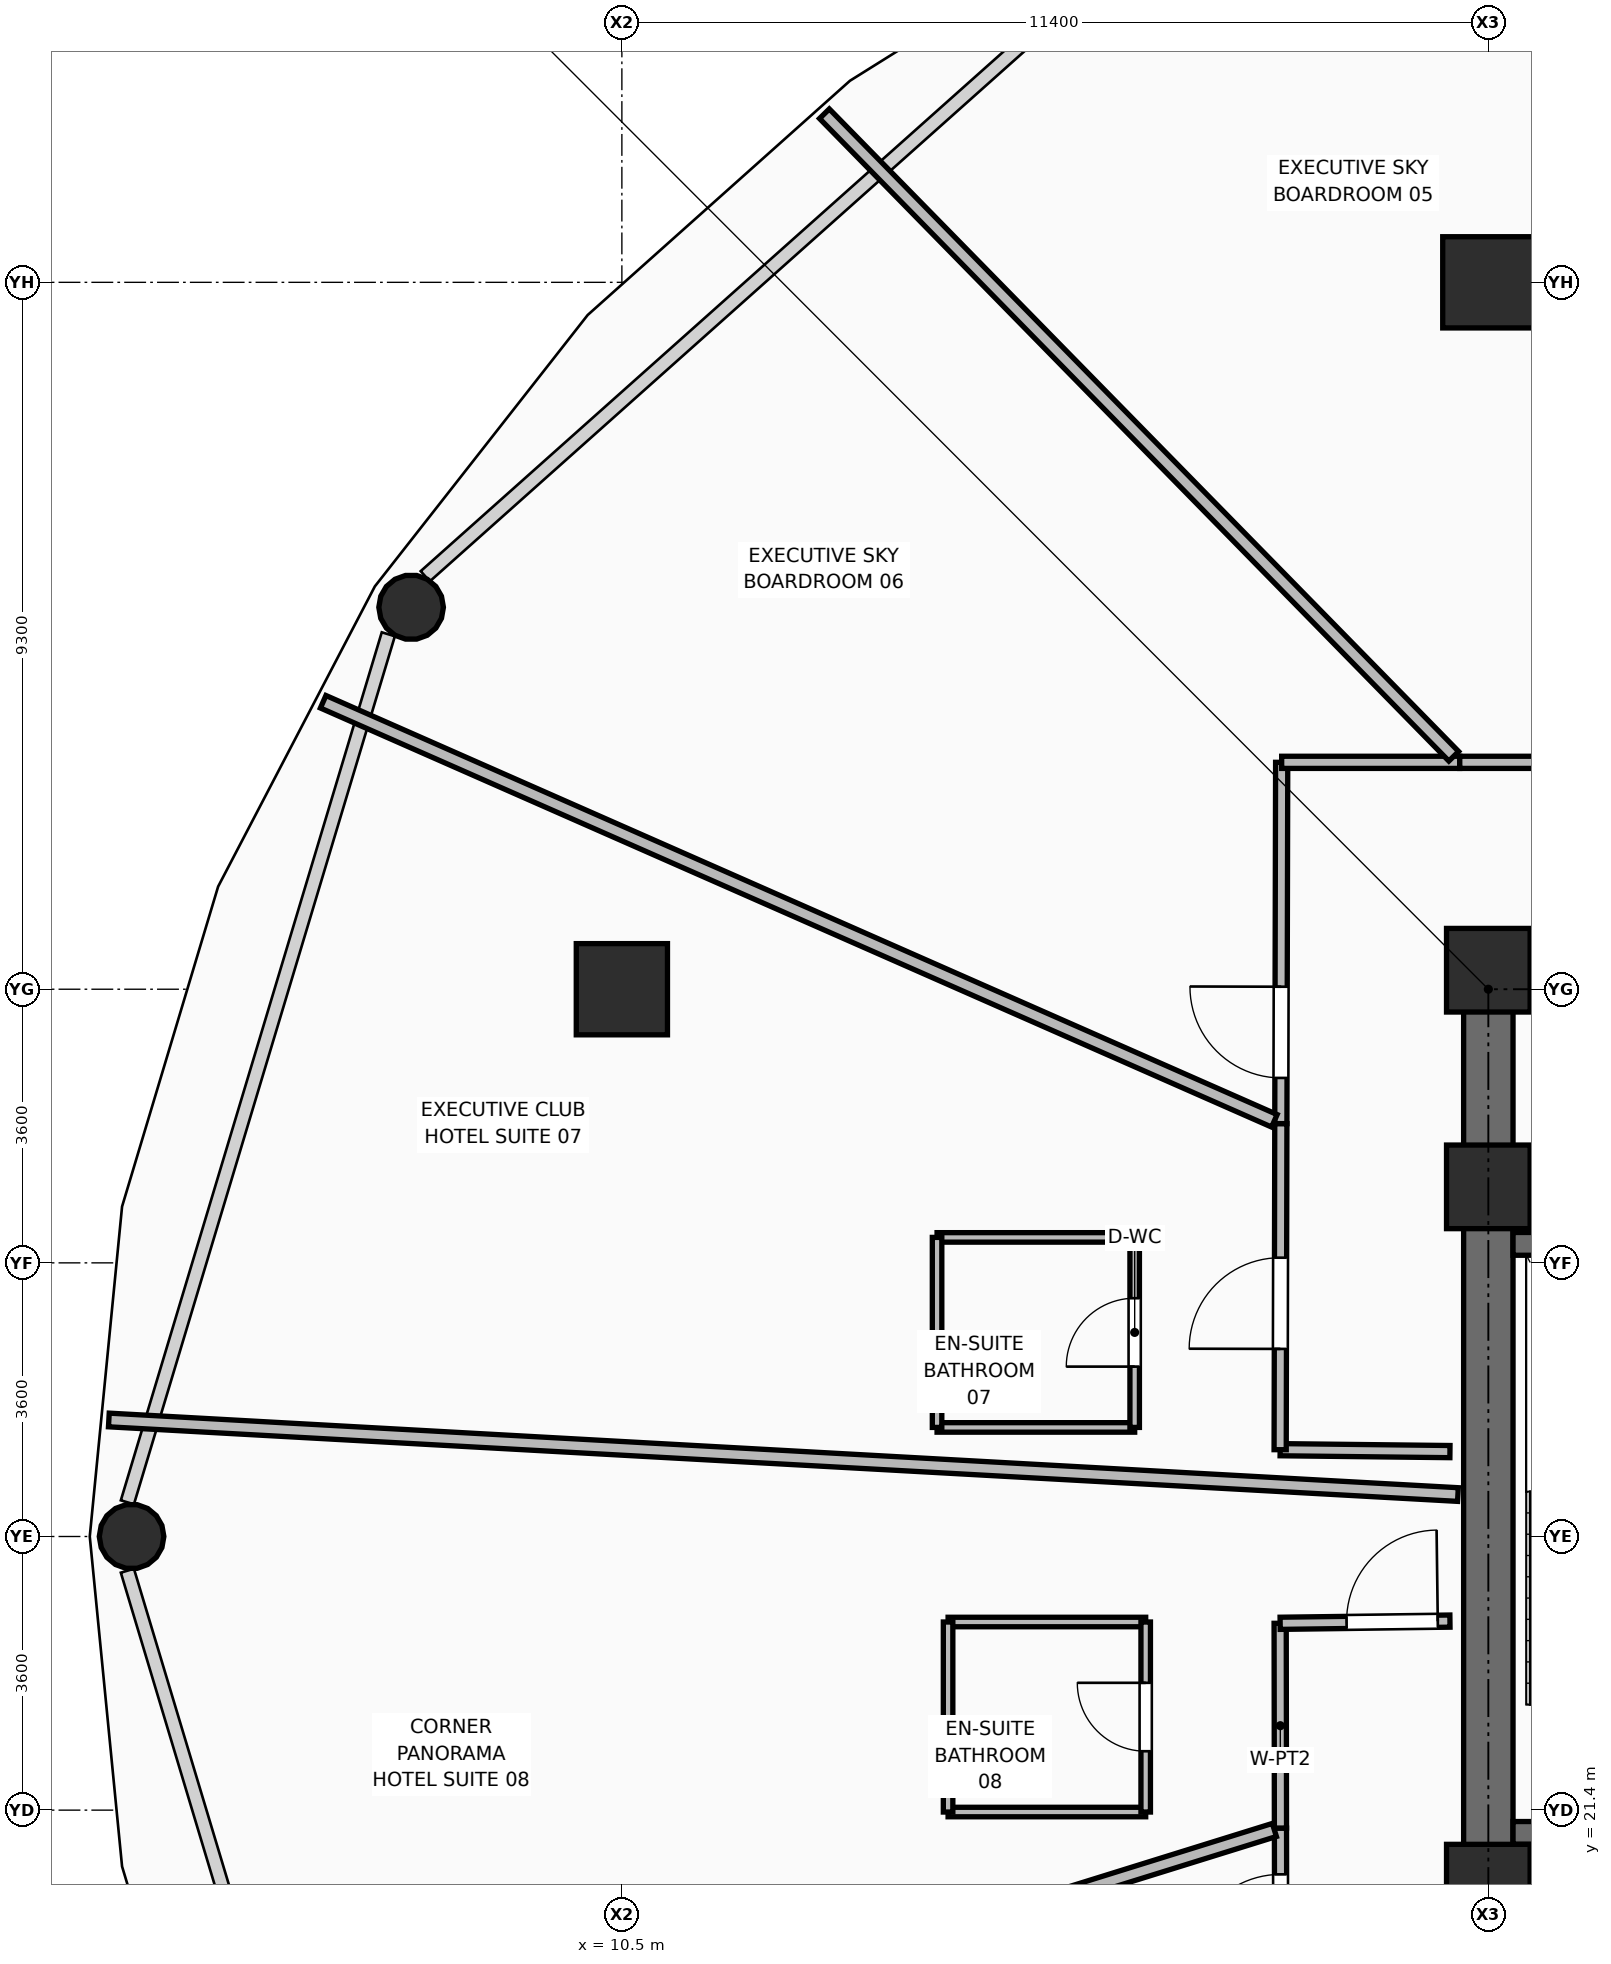
"""IFC4 building model, lengths in metres.
Left out: names, types, materials, properties, quantities, classifications, styles, units other than length and angle.
Written with IfcOpenShell. Run it as: python <this file> out.ifc"""

import sys

from ifc_helpers import new_model, si_unit, direction, frame, frame_2d, origin, origin_2d, place, context, subcontext, project, spatial, rectangle, hollow_rectangle, hollow_circle, extrude, element, fill, save


model = new_model("IFC4")
c1 = context("Model", 3, precision=1e-05, world=origin(), true_north=direction((0.0, 1.0)))
c2 = subcontext(c1, "Body", "Model", "MODEL_VIEW")
j1 = project(units=[si_unit("LENGTHUNIT", "METRE"), si_unit("PLANEANGLEUNIT", "RADIAN")], contexts=[c1])
p1 = place(None, origin())
s1 = spatial("IfcSite", under=j1, at=p1, CompositionType="ELEMENT")
p2 = place(p1, origin())
s2 = spatial("IfcBuilding", under=s1, at=p2, CompositionType="ELEMENT")
p3 = place(p2, frame((0.0, 0.0, 57.0)))
s3 = spatial("IfcBuildingStorey", under=s2, at=p3, CompositionType="ELEMENT", Elevation=57.0)
for number, where, z_axis, x_axis in (
    (1, (21.9, 20.4, 0.0), (0.0, 0.0, 1.0), (1.0, 0.0, 0.0)),
    (2, (21.9, 29.6, 0.0), (0.0, 0.0, 1.0), (1.0, 0.0, 0.0)),
    (3, (21.9, 32.45, 0.0), (0.0, 0.0, 1.0), (1.0, 0.0, 0.0)),
):
    element("IfcColumn", number, at=place(p3, frame(where, z_axis=z_axis, x_axis=x_axis)), inside=s3, PredefinedType="COLUMN", context=c2, shape_type="SweptSolid", body=[
        extrude(rectangle(XDim=1.1, YDim=1.1, at=origin_2d()), origin(), (0.0, 0.0, 1.0), 3.75),
    ])
for number, where, z_axis, x_axis in (
    (4, (10.5, 32.2, 0.0), (0.0, 0.0, 1.0), (1.0, 0.0, 0.0)),
    (5, (21.9, 41.5, 0.0), (0.0, 0.0, 1.0), (1.0, 0.0, 0.0)),
):
    element("IfcColumn", number, at=place(p3, frame(where, z_axis=z_axis, x_axis=x_axis)), inside=s3, PredefinedType="COLUMN", context=c2, shape_type="SweptSolid", body=[
        extrude(hollow_rectangle(XDim=1.2, YDim=1.2, WallThickness=0.045, at=origin_2d()), origin(), (0.0, 0.0, 1.0), 3.75),
    ])
for number, where, z_axis, x_axis in (
    (6, (7.727, 37.225, 0.0), (0.0, 0.0, 1.0), (1.0, 0.0, 0.0)),
    (7, (4.049, 25.0, 0.0), (0.0, 0.0, 1.0), (1.0, 0.0, 0.0)),
):
    element("IfcColumn", number, at=place(p3, frame(where, z_axis=z_axis, x_axis=x_axis)), inside=s3, PredefinedType="COLUMN", context=c2, shape_type="SweptSolid", body=[
        extrude(hollow_circle(Radius=0.425, WallThickness=0.04, at=origin_2d()), origin(), (0.0, 0.0, 1.0), 3.57),
    ])
p4 = place(p3, frame((21.575, 32.45, 0.0), z_axis=(0.0, 0.0, 1.0), x_axis=(1.0, 0.0, 0.0)))
e8 = element("IfcWall", 8, at=p4, inside=s3, PredefinedType="SHEAR", context=c2, shape_type="SweptSolid", body=[
    extrude(rectangle(XDim=19.85, YDim=0.65, at=frame_2d((9.925, 0.0))), origin(), (0.0, 0.0, 1.0), 3.57),
])
p5 = place(p4, frame((2.175, 0.0, 0.0)))
e9 = element("IfcOpeningElement", 9, at=p5, cuts=e8, PredefinedType="OPENING", context=c2, shape_type="SweptSolid", body=[
    extrude(rectangle(XDim=1.1, YDim=2.1, at=frame_2d((0.55, 1.05))), frame((0.0, 0.335, 0.0), z_axis=(0.0, -1.0, 0.0), x_axis=(1.0, 0.0, 0.0)), (0.0, 0.0, 1.0), 0.67),
])
p6 = place(p4, frame((15.565, 0.0, 0.0)))
e10 = element("IfcOpeningElement", 10, at=p6, cuts=e8, PredefinedType="OPENING", context=c2, shape_type="SweptSolid", body=[
    extrude(rectangle(XDim=1.0, YDim=2.1, at=frame_2d((0.5, 1.05))), frame((0.0, 0.335, 0.0), z_axis=(0.0, -1.0, 0.0), x_axis=(1.0, 0.0, 0.0)), (0.0, 0.0, 1.0), 0.67),
])
p7 = place(p4, frame((17.575, 0.0, 0.0)))
e11 = element("IfcOpeningElement", 11, at=p7, cuts=e8, PredefinedType="OPENING", context=c2, shape_type="SweptSolid", body=[
    extrude(rectangle(XDim=0.9, YDim=2.1, at=frame_2d((0.45, 1.05))), frame((0.0, 0.335, 0.0), z_axis=(0.0, -1.0, 0.0), x_axis=(1.0, 0.0, 0.0)), (0.0, 0.0, 1.0), 0.67),
])
p8 = place(p3, frame((21.9, 18.125, 0.0), z_axis=(0.0, 0.0, 1.0), x_axis=(0.0, 1.0, 0.0)))
e12 = element("IfcWall", 12, at=p8, inside=s3, PredefinedType="SHEAR", context=c2, shape_type="SweptSolid", body=[
    extrude(rectangle(XDim=14.0, YDim=0.65, at=frame_2d((7.0, 0.0))), origin(), (0.0, 0.0, 1.0), 3.57),
])
p9 = place(p3, frame((22.225, 21.1, 0.0), z_axis=(0.0, 0.0, 1.0), x_axis=(1.0, 0.0, 0.0)))
e13 = element("IfcWall", 13, at=p9, inside=s3, PredefinedType="SHEAR", context=c2, shape_type="SweptSolid", body=[
    extrude(rectangle(XDim=3.515, YDim=0.3, at=frame_2d((1.757, 0.0))), origin(), (0.0, 0.0, 1.0), 3.57),
])
p10 = place(p9, frame((1.995, 0.0, 0.0)))
e14 = element("IfcOpeningElement", 14, at=p10, cuts=e13, PredefinedType="OPENING", context=c2, shape_type="SweptSolid", body=[
    extrude(rectangle(XDim=1.05, YDim=2.1, at=frame_2d((0.525, 1.05))), frame((0.0, 0.16, 0.0), z_axis=(0.0, -1.0, 0.0), x_axis=(1.0, 0.0, 0.0)), (0.0, 0.0, 1.0), 0.32),
])
p11 = place(p3, frame((22.225, 28.85, 0.0), z_axis=(0.0, 0.0, 1.0), x_axis=(1.0, 0.0, 0.0)))
e15 = element("IfcWall", 15, at=p11, inside=s3, PredefinedType="SHEAR", context=c2, shape_type="SweptSolid", body=[
    extrude(rectangle(XDim=3.515, YDim=0.3, at=frame_2d((1.757, 0.0))), origin(), (0.0, 0.0, 1.0), 3.57),
])
p12 = place(p3, frame((21.395, 26.117, 0.0), z_axis=(0.0, 0.0, 1.0), x_axis=(-0.999936661747, 0.011254887571, 0.0)))
e16 = element("IfcWall", 16, at=p12, inside=s3, PredefinedType="PARTITIONING", context=c2, shape_type="SweptSolid", body=[
    extrude(rectangle(XDim=2.234, YDim=0.16, at=frame_2d((1.117, 0.0))), origin(), (0.0, 0.0, 1.0), 3.55),
])
p13 = place(p3, frame((19.161, 26.142, 0.0), z_axis=(0.0, 0.0, 1.0), x_axis=(0.002105737748, 0.999997782932, 0.0)))
e17 = element("IfcWall", 17, at=p13, inside=s3, PredefinedType="PARTITIONING", context=c2, shape_type="SweptSolid", body=[
    extrude(rectangle(XDim=4.29, YDim=0.16, at=frame_2d((2.145, 0.0))), origin(), (0.0, 0.0, 1.0), 3.55),
])
p14 = place(p13, frame((1.326, 0.0, 0.0)))
e18 = element("IfcOpeningElement", 18, at=p14, cuts=e17, PredefinedType="OPENING", context=c2, shape_type="SweptSolid", body=[
    extrude(rectangle(XDim=1.2, YDim=2.1, at=frame_2d((0.6, 1.05))), frame((0.0, 0.09, 0.0), z_axis=(0.0, -1.0, 0.0), x_axis=(1.0, 0.0, 0.0)), (0.0, 0.0, 1.0), 0.18),
])
p15 = place(p3, frame((19.17, 30.432, 0.0), z_axis=(0.0, 0.0, 1.0), x_axis=(0.002311360614, 0.999997328802, 0.0)))
e19 = element("IfcWall", 19, at=p15, inside=s3, PredefinedType="PARTITIONING", context=c2, shape_type="SweptSolid", body=[
    extrude(rectangle(XDim=4.753, YDim=0.16, at=frame_2d((2.376, 0.0))), origin(), (0.0, 0.0, 1.0), 2.928),
])
p16 = place(p15, frame((0.601, 0.0, 0.0)))
e20 = element("IfcOpeningElement", 20, at=p16, cuts=e19, PredefinedType="OPENING", context=c2, shape_type="SweptSolid", body=[
    extrude(rectangle(XDim=1.2, YDim=2.1, at=frame_2d((0.6, 1.05))), frame((0.0, 0.09, 0.0), z_axis=(0.0, -1.0, 0.0), x_axis=(1.0, 0.0, 0.0)), (0.0, 0.0, 1.0), 0.18),
])
p17 = place(p3, frame((19.181, 35.185, 0.0), z_axis=(0.0, 0.0, 1.0), x_axis=(1.0, 0.0, 0.0)))
e21 = element("IfcWall", 21, at=p17, inside=s3, PredefinedType="PARTITIONING", context=c2, shape_type="SweptSolid", body=[
    extrude(rectangle(XDim=2.343, YDim=0.16, at=frame_2d((1.171, 0.0))), origin(), (0.0, 0.0, 1.0), 2.928),
])
p18 = place(p3, frame((21.524, 35.185, 0.0), z_axis=(0.0, 0.0, 1.0), x_axis=(1.0, 0.0, 0.0)))
e22 = element("IfcWall", 22, at=p18, inside=s3, PredefinedType="PARTITIONING", context=c2, shape_type="SweptSolid", body=[
    extrude(rectangle(XDim=6.093, YDim=0.16, at=frame_2d((3.046, 0.0))), origin(), (0.0, 0.0, 1.0), 3.55),
])
p19 = place(p18, frame((2.373, 0.0, 0.0)))
e23 = element("IfcOpeningElement", 23, at=p19, cuts=e22, PredefinedType="OPENING", context=c2, shape_type="SweptSolid", body=[
    extrude(rectangle(XDim=1.2, YDim=2.1, at=frame_2d((0.6, 1.05))), frame((0.0, 0.09, 0.0), z_axis=(0.0, -1.0, 0.0), x_axis=(1.0, 0.0, 0.0)), (0.0, 0.0, 1.0), 0.18),
])
p20 = place(p3, frame((19.176, 15.151, 0.0), z_axis=(0.0, 0.0, 1.0), x_axis=(-0.001827037145, 0.999998330966, 0.0)))
e24 = element("IfcWall", 24, at=p20, inside=s3, PredefinedType="PARTITIONING", context=c2, shape_type="SweptSolid", body=[
    extrude(rectangle(XDim=6.013, YDim=0.16, at=frame_2d((3.007, 0.0))), origin(), (0.0, 0.0, 1.0), 2.928),
])
p21 = place(p20, frame((4.204, 0.0, 0.0)))
e25 = element("IfcOpeningElement", 25, at=p21, cuts=e24, PredefinedType="OPENING", context=c2, shape_type="SweptSolid", body=[
    extrude(rectangle(XDim=1.2, YDim=2.1, at=frame_2d((0.6, 1.05))), frame((0.0, 0.09, 0.0), z_axis=(0.0, -1.0, 0.0), x_axis=(1.0, 0.0, 0.0)), (0.0, 0.0, 1.0), 0.18),
])
p22 = place(p3, frame((19.165, 21.164, 0.0), z_axis=(0.0, 0.0, 1.0), x_axis=(-0.001540690577, 0.999998813136, 0.0)))
e26 = element("IfcWall", 26, at=p22, inside=s3, PredefinedType="PARTITIONING", context=c2, shape_type="SweptSolid", body=[
    extrude(rectangle(XDim=2.694, YDim=0.16, at=frame_2d((1.347, 0.0))), origin(), (0.0, 0.0, 1.0), 2.928),
])
p23 = place(p3, frame((19.161, 23.858, 0.0), z_axis=(0.0, 0.0, 1.0), x_axis=(0.999915458151, 0.013002943888, 0.0)))
e27 = element("IfcWall", 27, at=p23, inside=s3, PredefinedType="PARTITIONING", context=c2, shape_type="SweptSolid", body=[
    extrude(rectangle(XDim=2.234, YDim=0.16, at=frame_2d((1.117, 0.0))), origin(), (0.0, 0.0, 1.0), 3.55),
])
p24 = place(p23, frame((0.874, 0.0, 0.0)))
e28 = element("IfcOpeningElement", 28, at=p24, cuts=e27, PredefinedType="OPENING", context=c2, shape_type="SweptSolid", body=[
    extrude(rectangle(XDim=1.2, YDim=2.1, at=frame_2d((0.6, 1.05))), frame((0.0, 0.09, 0.0), z_axis=(0.0, -1.0, 0.0), x_axis=(1.0, 0.0, 0.0)), (0.0, 0.0, 1.0), 0.18),
])
p25 = place(p3, frame((27.587, 35.265, 0.0), z_axis=(0.0, 0.0, 1.0), x_axis=(-0.356216214418, 0.93440355767, 0.0)))
e29 = element("IfcWall", 29, at=p25, inside=s3, PredefinedType="PARTITIONING", context=c2, shape_type="SweptSolid", body=[
    extrude(rectangle(XDim=14.202, YDim=0.18, at=frame_2d((7.101, 0.0))), origin(), (0.0, 0.0, 1.0), 2.775),
])
p26 = place(p3, frame((21.445, 35.265, 0.0), z_axis=(0.0, 0.0, 1.0), x_axis=(-0.699754693744, 0.714383208498, 0.0)))
e30 = element("IfcWall", 30, at=p26, inside=s3, PredefinedType="PARTITIONING", context=c2, shape_type="SweptSolid", body=[
    extrude(rectangle(XDim=11.833, YDim=0.18, at=frame_2d((5.917, 0.0))), origin(), (0.0, 0.0, 1.0), 2.775),
])
p27 = place(p3, frame((19.085, 30.469, 0.0), z_axis=(0.0, 0.0, 1.0), x_axis=(-0.915142788341, 0.403129851223, 0.0)))
e31 = element("IfcWall", 31, at=p27, inside=s3, PredefinedType="PARTITIONING", context=c2, shape_type="SweptSolid", body=[
    extrude(rectangle(XDim=13.675, YDim=0.18, at=frame_2d((6.838, 0.0))), origin(), (0.0, 0.0, 1.0), 2.775),
])
p28 = place(p3, frame((21.5, 25.552, 0.0), z_axis=(0.0, 0.0, 1.0), x_axis=(-0.998476368936, 0.055180981107, 0.0)))
e32 = element("IfcWall", 32, at=p28, inside=s3, PredefinedType="PARTITIONING", context=c2, shape_type="SweptSolid", body=[
    extrude(rectangle(XDim=17.777, YDim=0.18, at=frame_2d((8.889, 0.0))), origin(), (0.0, 0.0, 1.0), 2.595),
])
p29 = place(p3, frame((19.085, 21.139, 0.0), z_axis=(0.0, 0.0, 1.0), x_axis=(-0.954884570259, -0.296977200271, 0.0)))
e33 = element("IfcWall", 33, at=p29, inside=s3, PredefinedType="PARTITIONING", context=c2, shape_type="SweptSolid", body=[
    extrude(rectangle(XDim=14.56, YDim=0.18, at=frame_2d((7.28, 0.0))), origin(), (0.0, 0.0, 1.0), 2.775),
])
for number, where, z_axis, x_axis in (
    (34, (14.647, 26.435, 0.0), (0.0, 0.0, 1.0), (1.0, 0.0, 0.0)),
    (35, (14.647, 28.935, 0.0), (0.0, 0.0, 1.0), (1.0, 0.0, 0.0)),
):
    element("IfcWall", number, at=place(p3, frame(where, z_axis=z_axis, x_axis=x_axis)), inside=s3, PredefinedType="PARTITIONING", context=c2, shape_type="SweptSolid", body=[
        extrude(rectangle(XDim=2.6, YDim=0.125, at=frame_2d((1.3, 0.0))), origin(), (0.0, 0.0, 1.0), 3.55),
    ])
p30 = place(p3, frame((14.647, 26.435, 0.0), z_axis=(0.0, 0.0, 1.0), x_axis=(0.0, 1.0, 0.0)))
e36 = element("IfcWall", 36, at=p30, inside=s3, PredefinedType="PARTITIONING", context=c2, shape_type="SweptSolid", body=[
    extrude(rectangle(XDim=2.5, YDim=0.125, at=frame_2d((1.25, 0.0))), origin(), (0.0, 0.0, 1.0), 3.55),
])
p31 = place(p3, frame((17.247, 26.435, 0.0), z_axis=(0.0, 0.0, 1.0), x_axis=(0.0, 1.0, 0.0)))
e37 = element("IfcWall", 37, at=p31, inside=s3, PredefinedType="PARTITIONING", context=c2, shape_type="SweptSolid", body=[
    extrude(rectangle(XDim=2.5, YDim=0.125, at=frame_2d((1.25, 0.0))), origin(), (0.0, 0.0, 1.0), 3.55),
])
p32 = place(p31, frame((0.8, 0.0, 0.0)))
e38 = element("IfcOpeningElement", 38, at=p32, cuts=e37, PredefinedType="OPENING", context=c2, shape_type="SweptSolid", body=[
    extrude(rectangle(XDim=0.9, YDim=2.1, at=frame_2d((0.45, 1.05))), frame((0.0, 0.073, 0.0), z_axis=(0.0, -1.0, 0.0), x_axis=(1.0, 0.0, 0.0)), (0.0, 0.0, 1.0), 0.145),
])
p33 = place(p3, frame((14.792, 21.375, 0.0), z_axis=(0.0, 0.0, 1.0), x_axis=(1.0, 0.0, 0.0)))
e39 = element("IfcWall", 39, at=p33, inside=s3, PredefinedType="PARTITIONING", context=c2, shape_type="SweptSolid", body=[
    extrude(rectangle(XDim=2.6, YDim=0.125, at=frame_2d((1.3, 0.0))), origin(), (0.0, 0.0, 1.0), 2.928),
])
p34 = place(p3, frame((14.792, 23.875, 0.0), z_axis=(0.0, 0.0, 1.0), x_axis=(1.0, 0.0, 0.0)))
e40 = element("IfcWall", 40, at=p34, inside=s3, PredefinedType="PARTITIONING", context=c2, shape_type="SweptSolid", body=[
    extrude(rectangle(XDim=2.6, YDim=0.125, at=frame_2d((1.3, 0.0))), origin(), (0.0, 0.0, 1.0), 3.55),
])
p35 = place(p3, frame((14.792, 21.375, 0.0), z_axis=(0.0, 0.0, 1.0), x_axis=(0.0, 1.0, 0.0)))
e41 = element("IfcWall", 41, at=p35, inside=s3, PredefinedType="PARTITIONING", context=c2, shape_type="SweptSolid", body=[
    extrude(rectangle(XDim=2.5, YDim=0.125, at=frame_2d((1.25, 0.0))), origin(), (0.0, 0.0, 1.0), 2.928),
])
p36 = place(p3, frame((17.392, 21.375, 0.0), z_axis=(0.0, 0.0, 1.0), x_axis=(0.0, 1.0, 0.0)))
e42 = element("IfcWall", 42, at=p36, inside=s3, PredefinedType="PARTITIONING", context=c2, shape_type="SweptSolid", body=[
    extrude(rectangle(XDim=2.5, YDim=0.125, at=frame_2d((1.25, 0.0))), origin(), (0.0, 0.0, 1.0), 2.928),
])
p37 = place(p36, frame((0.8, 0.0, 0.0)))
e43 = element("IfcOpeningElement", 43, at=p37, cuts=e42, PredefinedType="OPENING", context=c2, shape_type="SweptSolid", body=[
    extrude(rectangle(XDim=0.9, YDim=2.1, at=frame_2d((0.45, 1.05))), frame((0.0, 0.073, 0.0), z_axis=(0.0, -1.0, 0.0), x_axis=(1.0, 0.0, 0.0)), (0.0, 0.0, 1.0), 0.145),
])
p38 = place(p16, origin())
e44 = element("IfcDoor", 44, at=p38, inside=s3, OperationType="SINGLE_SWING_RIGHT", PredefinedType="DOOR", context=c2, shape_type="SweptSolid", body=[
    extrude(rectangle(XDim=1.2, YDim=2.1, at=frame_2d((0.6, 1.05))), frame((0.0, 0.025, 0.0), z_axis=(0.0, -1.0, 0.0), x_axis=(1.0, 0.0, 0.0)), (0.0, 0.0, 1.0), 0.05),
])
fill(e20, e44)
p39 = place(p32, origin())
e45 = element("IfcDoor", 45, at=p39, inside=s3, OperationType="SINGLE_SWING_LEFT", PredefinedType="DOOR", context=c2, shape_type="SweptSolid", body=[
    extrude(rectangle(XDim=0.9, YDim=2.1, at=frame_2d((0.45, 1.05))), frame((0.0, 0.025, 0.0), z_axis=(0.0, -1.0, 0.0), x_axis=(1.0, 0.0, 0.0)), (0.0, 0.0, 1.0), 0.05),
])
fill(e38, e45)
p40 = place(p14, origin())
e46 = element("IfcDoor", 46, at=p40, inside=s3, OperationType="SINGLE_SWING_LEFT", PredefinedType="DOOR", context=c2, shape_type="SweptSolid", body=[
    extrude(rectangle(XDim=1.2, YDim=2.1, at=frame_2d((0.6, 1.05))), frame((0.0, 0.025, 0.0), z_axis=(0.0, -1.0, 0.0), x_axis=(1.0, 0.0, 0.0)), (0.0, 0.0, 1.0), 0.05),
])
fill(e18, e46)
p41 = place(p37, origin())
e47 = element("IfcDoor", 47, at=p41, inside=s3, OperationType="SINGLE_SWING_RIGHT", PredefinedType="DOOR", context=c2, shape_type="SweptSolid", body=[
    extrude(rectangle(XDim=0.9, YDim=2.1, at=frame_2d((0.45, 1.05))), frame((0.0, 0.025, 0.0), z_axis=(0.0, -1.0, 0.0), x_axis=(1.0, 0.0, 0.0)), (0.0, 0.0, 1.0), 0.05),
])
fill(e43, e47)
p42 = place(p24, origin())
e48 = element("IfcDoor", 48, at=p42, inside=s3, OperationType="SINGLE_SWING_RIGHT", PredefinedType="DOOR", context=c2, shape_type="SweptSolid", body=[
    extrude(rectangle(XDim=1.2, YDim=2.1, at=frame_2d((0.6, 1.05))), frame((0.0, 0.025, 0.0), z_axis=(0.0, -1.0, 0.0), x_axis=(1.0, 0.0, 0.0)), (0.0, 0.0, 1.0), 0.05),
])
fill(e28, e48)
p43 = place(p21, origin())
e49 = element("IfcDoor", 49, at=p43, inside=s3, OperationType="SINGLE_SWING_LEFT", PredefinedType="DOOR", context=c2, shape_type="SweptSolid", body=[
    extrude(rectangle(XDim=1.2, YDim=2.1, at=frame_2d((0.6, 1.05))), frame((0.0, 0.025, 0.0), z_axis=(0.0, -1.0, 0.0), x_axis=(1.0, 0.0, 0.0)), (0.0, 0.0, 1.0), 0.05),
])
fill(e25, e49)
save(model, sys.argv[1])
